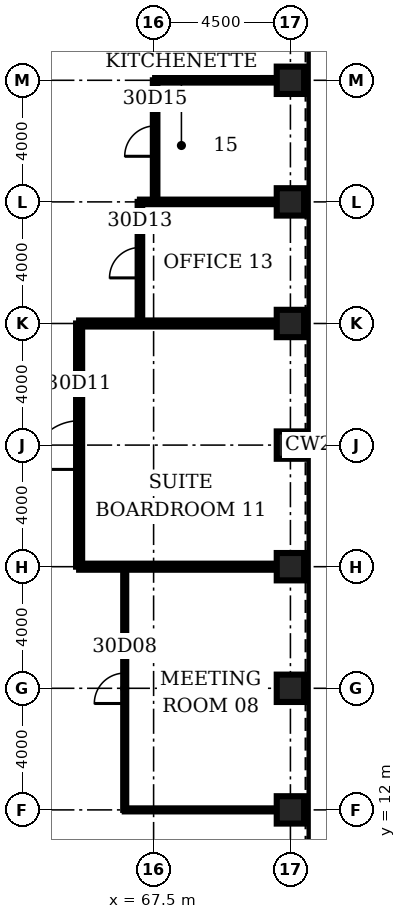
"""IFC4 building model, lengths in metres.
Left out: names, types, materials, properties, quantities, classifications, styles, units other than length and angle.
Written with IfcOpenShell. Run it as: python <this file> out.ifc"""

import sys

from ifc_helpers import new_model, si_unit, direction, frame, frame_2d, origin, origin_2d, place, context, subcontext, project, spatial, rectangle, hollow_rectangle, extrude, element, fill, save


model = new_model("IFC4")
c1 = context("Model", 3, precision=1e-05, world=origin(), true_north=direction((0.0, 1.0)))
c2 = subcontext(c1, "Body", "Model", "MODEL_VIEW")
j1 = project(units=[si_unit("LENGTHUNIT", "METRE"), si_unit("PLANEANGLEUNIT", "RADIAN")], contexts=[c1])
p1 = place(None, origin())
s1 = spatial("IfcSite", under=j1, at=p1, CompositionType="ELEMENT")
p2 = place(p1, origin())
s2 = spatial("IfcBuilding", under=s1, at=p2, CompositionType="ELEMENT")
p3 = place(p2, frame((0.0, 0.0, 138.3)))
s3 = spatial("IfcBuildingStorey", under=s2, at=p3, CompositionType="ELEMENT", Elevation=138.3)
for number, where, z_axis, x_axis in (
    (1, (72.0, 12.0, 0.0), (0.0, 0.0, 1.0), (1.0, 0.0, 0.0)),
    (2, (72.0, 16.0, 0.0), (0.0, 0.0, 1.0), (1.0, 0.0, 0.0)),
    (3, (72.0, 20.0, 0.0), (0.0, 0.0, 1.0), (1.0, 0.0, 0.0)),
    (4, (72.0, 24.0, 0.0), (0.0, 0.0, 1.0), (1.0, 0.0, 0.0)),
    (5, (72.0, 28.0, 0.0), (0.0, 0.0, 1.0), (1.0, 0.0, 0.0)),
    (6, (72.0, 32.0, 0.0), (0.0, 0.0, 1.0), (1.0, 0.0, 0.0)),
    (7, (72.0, 36.0, 0.0), (0.0, 0.0, 1.0), (1.0, 0.0, 0.0)),
):
    element("IfcColumn", number, at=place(p3, frame(where, z_axis=z_axis, x_axis=x_axis)), inside=s3, PredefinedType="COLUMN", context=c2, shape_type="SweptSolid", body=[
        extrude(hollow_rectangle(XDim=0.9, YDim=0.9, WallThickness=0.1, at=origin_2d()), origin(), (0.0, 0.0, 1.0), 4.2),
    ])
p4 = place(p3, frame((66.55, 12.0, 0.0), z_axis=(0.0, 0.0, 1.0), x_axis=(1.0, 0.0, 0.0)))
e8 = element("IfcWall", 8, at=p4, inside=s3, PredefinedType="PARTITIONING", context=c2, shape_type="SweptSolid", body=[
    extrude(rectangle(XDim=5.0, YDim=0.1, at=frame_2d((2.5, 0.0))), origin(), (0.0, 0.0, 1.0), 3.0),
])
for number, where, z_axis, x_axis in (
    (9, (65.05, 20.0, 0.0), (0.0, 0.0, 1.0), (1.0, 0.0, 0.0)),
    (10, (65.05, 28.0, 0.0), (0.0, 0.0, 1.0), (1.0, 0.0, 0.0)),
):
    element("IfcWall", number, at=place(p3, frame(where, z_axis=z_axis, x_axis=x_axis)), inside=s3, PredefinedType="PARTITIONING", context=c2, shape_type="SweptSolid", body=[
        extrude(rectangle(XDim=6.5, YDim=0.2, at=frame_2d((3.25, 0.0))), origin(), (0.0, 0.0, 1.0), 3.0),
    ])
p5 = place(p3, frame((67.05, 32.0, 0.0), z_axis=(0.0, 0.0, 1.0), x_axis=(1.0, 0.0, 0.0)))
e11 = element("IfcWall", 11, at=p5, inside=s3, PredefinedType="PARTITIONING", context=c2, shape_type="SweptSolid", body=[
    extrude(rectangle(XDim=4.5, YDim=0.15, at=frame_2d((2.25, 0.0))), origin(), (0.0, 0.0, 1.0), 3.0),
])
p6 = place(p3, frame((67.55, 36.0, 0.0), z_axis=(0.0, 0.0, 1.0), x_axis=(1.0, 0.0, 0.0)))
e12 = element("IfcWall", 12, at=p6, inside=s3, PredefinedType="PARTITIONING", context=c2, shape_type="SweptSolid", body=[
    extrude(rectangle(XDim=4.0, YDim=0.15, at=frame_2d((2.0, 0.0))), origin(), (0.0, 0.0, 1.0), 3.0),
])
p7 = place(p3, frame((65.05, 20.0, 0.0), z_axis=(0.0, 0.0, 1.0), x_axis=(0.0, 1.0, 0.0)))
e13 = element("IfcWall", 13, at=p7, inside=s3, PredefinedType="PARTITIONING", context=c2, shape_type="SweptSolid", body=[
    extrude(rectangle(XDim=8.0, YDim=0.2, at=frame_2d((4.0, 0.0))), origin(), (0.0, 0.0, 1.0), 3.0),
])
p8 = place(p7, frame((3.2, 0.0, 0.0)))
e14 = element("IfcOpeningElement", 14, at=p8, cuts=e13, PredefinedType="OPENING", context=c2, shape_type="SweptSolid", body=[
    extrude(rectangle(XDim=1.6, YDim=2.1, at=frame_2d((0.8, 1.05))), frame((0.0, 0.11, 0.0), z_axis=(0.0, -1.0, 0.0), x_axis=(1.0, 0.0, 0.0)), (0.0, 0.0, 1.0), 0.22),
])
p9 = place(p3, frame((66.55, 12.0, 0.0), z_axis=(0.0, 0.0, 1.0), x_axis=(0.0, 1.0, 0.0)))
e15 = element("IfcWall", 15, at=p9, inside=s3, PredefinedType="PARTITIONING", context=c2, shape_type="SweptSolid", body=[
    extrude(rectangle(XDim=8.0, YDim=0.1, at=frame_2d((4.0, 0.0))), origin(), (0.0, 0.0, 1.0), 3.0),
])
p10 = place(p9, frame((3.5, 0.0, 0.0)))
e16 = element("IfcOpeningElement", 16, at=p10, cuts=e15, PredefinedType="OPENING", context=c2, shape_type="SweptSolid", body=[
    extrude(rectangle(XDim=1.0, YDim=2.1, at=frame_2d((0.5, 1.05))), frame((0.0, 0.06, 0.0), z_axis=(0.0, -1.0, 0.0), x_axis=(1.0, 0.0, 0.0)), (0.0, 0.0, 1.0), 0.12),
])
p11 = place(p3, frame((67.05, 28.0, 0.0), z_axis=(0.0, 0.0, 1.0), x_axis=(0.0, 1.0, 0.0)))
e17 = element("IfcWall", 17, at=p11, inside=s3, PredefinedType="PARTITIONING", context=c2, shape_type="SweptSolid", body=[
    extrude(rectangle(XDim=4.0, YDim=0.15, at=frame_2d((2.0, 0.0))), origin(), (0.0, 0.0, 1.0), 3.0),
])
p12 = place(p11, frame((1.5, 0.0, 0.0)))
e18 = element("IfcOpeningElement", 18, at=p12, cuts=e17, PredefinedType="OPENING", context=c2, shape_type="SweptSolid", body=[
    extrude(rectangle(XDim=1.0, YDim=2.1, at=frame_2d((0.5, 1.05))), frame((0.0, 0.085, 0.0), z_axis=(0.0, -1.0, 0.0), x_axis=(1.0, 0.0, 0.0)), (0.0, 0.0, 1.0), 0.17),
])
p13 = place(p3, frame((67.55, 32.0, 0.0), z_axis=(0.0, 0.0, 1.0), x_axis=(0.0, 1.0, 0.0)))
e19 = element("IfcWall", 19, at=p13, inside=s3, PredefinedType="PARTITIONING", context=c2, shape_type="SweptSolid", body=[
    extrude(rectangle(XDim=4.0, YDim=0.15, at=frame_2d((2.0, 0.0))), origin(), (0.0, 0.0, 1.0), 3.0),
])
p14 = place(p13, frame((1.5, 0.0, 0.0)))
e20 = element("IfcOpeningElement", 20, at=p14, cuts=e19, PredefinedType="OPENING", context=c2, shape_type="SweptSolid", body=[
    extrude(rectangle(XDim=1.0, YDim=2.1, at=frame_2d((0.5, 1.05))), frame((0.0, 0.085, 0.0), z_axis=(0.0, -1.0, 0.0), x_axis=(1.0, 0.0, 0.0)), (0.0, 0.0, 1.0), 0.17),
])
p15 = place(p10, origin())
e21 = element("IfcDoor", 21, at=p15, inside=s3, OperationType="SINGLE_SWING_LEFT", PredefinedType="DOOR", context=c2, shape_type="SweptSolid", body=[
    extrude(rectangle(XDim=1.0, YDim=2.1, at=frame_2d((0.5, 1.05))), frame((0.0, 0.025, 0.0), z_axis=(0.0, -1.0, 0.0), x_axis=(1.0, 0.0, 0.0)), (0.0, 0.0, 1.0), 0.05),
])
fill(e16, e21)
p16 = place(p8, origin())
e22 = element("IfcDoor", 22, at=p16, inside=s3, OperationType="SINGLE_SWING_LEFT", PredefinedType="DOOR", context=c2, shape_type="SweptSolid", body=[
    extrude(rectangle(XDim=1.6, YDim=2.1, at=frame_2d((0.8, 1.05))), frame((0.0, 0.025, 0.0), z_axis=(0.0, -1.0, 0.0), x_axis=(1.0, 0.0, 0.0)), (0.0, 0.0, 1.0), 0.05),
])
fill(e14, e22)
p17 = place(p12, origin())
e23 = element("IfcDoor", 23, at=p17, inside=s3, OperationType="SINGLE_SWING_LEFT", PredefinedType="DOOR", context=c2, shape_type="SweptSolid", body=[
    extrude(rectangle(XDim=1.0, YDim=2.1, at=frame_2d((0.5, 1.05))), frame((0.0, 0.025, 0.0), z_axis=(0.0, -1.0, 0.0), x_axis=(1.0, 0.0, 0.0)), (0.0, 0.0, 1.0), 0.05),
])
fill(e18, e23)
p18 = place(p14, origin())
e24 = element("IfcDoor", 24, at=p18, inside=s3, OperationType="SINGLE_SWING_LEFT", PredefinedType="DOOR", context=c2, shape_type="SweptSolid", body=[
    extrude(rectangle(XDim=1.0, YDim=2.1, at=frame_2d((0.5, 1.05))), frame((0.0, 0.025, 0.0), z_axis=(0.0, -1.0, 0.0), x_axis=(1.0, 0.0, 0.0)), (0.0, 0.0, 1.0), 0.05),
])
fill(e20, e24)
save(model, sys.argv[1])
